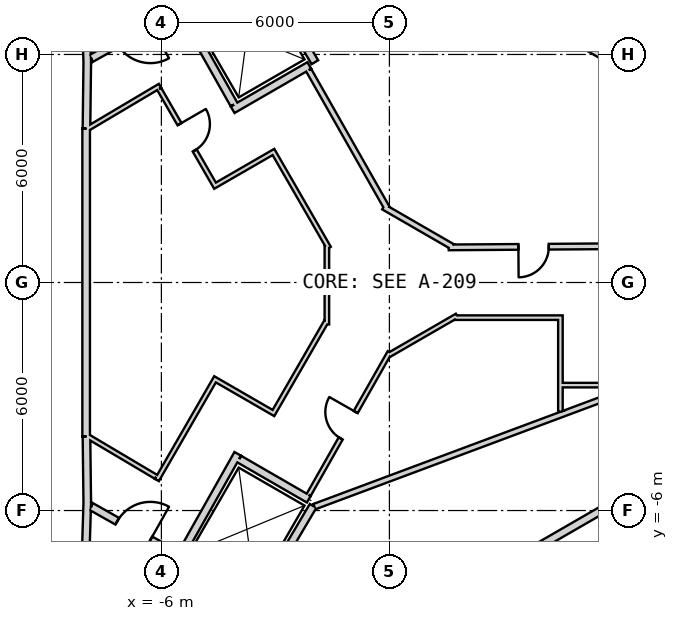
"""IFC4 building model, lengths in metres.
Left out: names, types, materials, properties, quantities, classifications, styles, units other than length and angle.
Written with IfcOpenShell. Run it as: python <this file> out.ifc"""

import sys

from ifc_helpers import new_model, si_unit, direction, frame, frame_2d, origin, place, context, subcontext, project, spatial, rectangle, extrude, element, fill, save


model = new_model("IFC4")
c1 = context("Model", 3, precision=1e-05, world=origin(), true_north=direction((0.0, 1.0)))
c2 = subcontext(c1, "Body", "Model", "MODEL_VIEW")
j1 = project(units=[si_unit("LENGTHUNIT", "METRE"), si_unit("PLANEANGLEUNIT", "RADIAN")], contexts=[c1])
p1 = place(None, origin())
s1 = spatial("IfcSite", under=j1, at=p1, CompositionType="ELEMENT")
p2 = place(p1, origin())
s2 = spatial("IfcBuilding", under=s1, at=p2, CompositionType="ELEMENT")
p3 = place(p2, frame((0.0, 0.0, 39.5)))
s3 = spatial("IfcBuildingStorey", under=s2, at=p3, CompositionType="ELEMENT", Elevation=39.5)
p4 = place(p3, frame((19.475, 2.208, 0.0), z_axis=(0.0, 0.0, 1.0), x_axis=(-0.866028369851, 0.499994862586, 0.0)))
e1 = element("IfcWall", 1, at=p4, inside=s3, PredefinedType="SHEAR", context=c2, shape_type="SweptSolid", body=[
    extrude(rectangle(XDim=31.523, YDim=0.9, at=frame_2d((15.762, 0.0))), origin(), (0.0, 0.0, 1.0), 6.0),
])
p5 = place(p4, frame((3.612, 0.0, 0.0)))
e2 = element("IfcOpeningElement", 2, at=p5, cuts=e1, PredefinedType="OPENING", context=c2, shape_type="SweptSolid", body=[
    extrude(rectangle(XDim=1.2, YDim=2.4, at=frame_2d((0.6, 1.2))), frame((0.0, 0.46, 0.0), z_axis=(0.0, -1.0, 0.0), x_axis=(1.0, 0.0, 0.0)), (0.0, 0.0, 1.0), 0.92),
])
p6 = place(p4, frame((26.712, 0.0, 0.0)))
e3 = element("IfcOpeningElement", 3, at=p6, cuts=e1, PredefinedType="OPENING", context=c2, shape_type="SweptSolid", body=[
    extrude(rectangle(XDim=1.2, YDim=2.4, at=frame_2d((0.6, 1.2))), frame((0.0, 0.46, 0.0), z_axis=(0.0, -1.0, 0.0), x_axis=(1.0, 0.0, 0.0)), (0.0, 0.0, 1.0), 0.92),
])
p7 = place(p3, frame((-7.825, -17.97, 0.0), z_axis=(0.0, 0.0, 1.0), x_axis=(0.866028369851, 0.499994862586, 0.0)))
e4 = element("IfcWall", 4, at=p7, inside=s3, PredefinedType="SHEAR", context=c2, shape_type="SweptSolid", body=[
    extrude(rectangle(XDim=31.523, YDim=0.9, at=frame_2d((15.762, 0.0))), origin(), (0.0, 0.0, 1.0), 6.0),
])
p8 = place(p7, frame((26.712, 0.0, 0.0)))
e5 = element("IfcOpeningElement", 5, at=p8, cuts=e4, PredefinedType="OPENING", context=c2, shape_type="SweptSolid", body=[
    extrude(rectangle(XDim=1.2, YDim=2.4, at=frame_2d((0.6, 1.2))), frame((0.0, 0.46, 0.0), z_axis=(0.0, -1.0, 0.0), x_axis=(1.0, 0.0, 0.0)), (0.0, 0.0, 1.0), 0.92),
])
p9 = place(p7, frame((3.612, 0.0, 0.0)))
e6 = element("IfcOpeningElement", 6, at=p9, cuts=e4, PredefinedType="OPENING", context=c2, shape_type="SweptSolid", body=[
    extrude(rectangle(XDim=1.2, YDim=2.4, at=frame_2d((0.6, 1.2))), frame((0.0, 0.46, 0.0), z_axis=(0.0, -1.0, 0.0), x_axis=(1.0, 0.0, 0.0)), (0.0, 0.0, 1.0), 0.92),
])
p10 = place(p3, frame((7.497, 4.886, 0.0), z_axis=(0.0, 0.0, 1.0), x_axis=(-0.866030989016, 0.499990325971, 0.0)))
e7 = element("IfcWall", 7, at=p10, inside=s3, PredefinedType="PLUMBINGWALL", context=c2, shape_type="SweptSolid", body=[
    extrude(rectangle(XDim=8.1, YDim=0.2, at=frame_2d((4.05, 0.0))), origin(), (0.0, 0.0, 1.0), 5.7),
])
p11 = place(p3, frame((-7.977, 6.65, 0.0), z_axis=(0.0, 0.0, 1.0), x_axis=(0.030861509705, -0.999523670164, 0.0)))
e8 = element("IfcWall", 8, at=p11, inside=s3, PredefinedType="PLUMBINGWALL", context=c2, shape_type="SweptSolid", body=[
    extrude(rectangle(XDim=0.878, YDim=0.2, at=frame_2d((0.439, 0.0))), origin(), (0.0, 0.0, 1.0), 5.7),
])
p12 = place(p3, frame((-7.949, 5.895, 0.0), z_axis=(0.0, 0.0, 1.0), x_axis=(-0.012042535896, -0.999927486035, 0.0)))
e9 = element("IfcWall", 9, at=p12, inside=s3, PredefinedType="PLUMBINGWALL", context=c2, shape_type="SweptSolid", body=[
    extrude(rectangle(XDim=1.845, YDim=0.2, at=frame_2d((0.922, 0.0))), origin(), (0.0, 0.0, 1.0), 5.7),
])
p13 = place(p3, frame((-7.98, 4.05, 0.0), z_axis=(0.0, 0.0, 1.0), x_axis=(0.0, -1.0, 0.0)))
e10 = element("IfcWall", 10, at=p13, inside=s3, PredefinedType="PLUMBINGWALL", context=c2, shape_type="SweptSolid", body=[
    extrude(rectangle(XDim=8.1, YDim=0.2, at=frame_2d((4.05, 0.0))), origin(), (0.0, 0.0, 1.0), 5.7),
])
p14 = place(p3, frame((-7.95, -5.772, 0.0), z_axis=(0.0, 0.0, 1.0), x_axis=(-0.030803413295, -0.999525462272, 0.0)))
e11 = element("IfcWall", 11, at=p14, inside=s3, PredefinedType="PLUMBINGWALL", context=c2, shape_type="SweptSolid", body=[
    extrude(rectangle(XDim=1.078, YDim=0.2, at=frame_2d((0.539, 0.0))), origin(), (0.0, 0.0, 1.0), 5.7),
])
p15 = place(p3, frame((-7.971, -4.05, 0.0), z_axis=(0.0, 0.0, 1.0), x_axis=(0.012042535896, -0.999927486035, 0.0)))
e12 = element("IfcWall", 12, at=p15, inside=s3, PredefinedType="PLUMBINGWALL", context=c2, shape_type="SweptSolid", body=[
    extrude(rectangle(XDim=1.845, YDim=0.2, at=frame_2d((0.922, 0.0))), origin(), (0.0, 0.0, 1.0), 5.7),
])
p16 = place(p3, frame((0.483, -8.936, 0.0), z_axis=(0.0, 0.0, 1.0), x_axis=(0.866030989016, 0.499990325971, 0.0)))
e13 = element("IfcWall", 13, at=p16, inside=s3, PredefinedType="PLUMBINGWALL", context=c2, shape_type="SweptSolid", body=[
    extrude(rectangle(XDim=8.1, YDim=0.2, at=frame_2d((4.05, 0.0))), origin(), (0.0, 0.0, 1.0), 5.7),
])
p17 = place(p3, frame((-3.538, 8.465, 0.0), z_axis=(0.0, 0.0, 1.0), x_axis=(0.508647062354, -0.860975125052, 0.0)))
e14 = element("IfcWall", 14, at=p17, inside=s3, PredefinedType="PLUMBINGWALL", context=c2, shape_type="SweptSolid", body=[
    extrude(rectangle(XDim=3.1, YDim=0.2, at=frame_2d((1.55, 0.0))), origin(), (0.0, 0.0, 1.0), 5.7),
])
p18 = place(p3, frame((-2.108, 5.711, 0.0), z_axis=(0.0, 0.0, 1.0), x_axis=(-0.866009305107, -0.50002788269, 0.0)))
e15 = element("IfcWall", 15, at=p18, inside=s3, PredefinedType="PLUMBINGWALL", context=c2, shape_type="SweptSolid", body=[
    extrude(rectangle(XDim=2.329, YDim=0.2, at=frame_2d((1.165, 0.0))), origin(), (0.0, 0.0, 1.0), 5.7),
])
p19 = place(p3, frame((-5.562, 7.296, 0.0), z_axis=(0.0, 0.0, 1.0), x_axis=(0.49134651263, -0.870964180966, 0.0)))
e16 = element("IfcWall", 16, at=p19, inside=s3, PredefinedType="PLUMBINGWALL", context=c2, shape_type="SweptSolid", body=[
    extrude(rectangle(XDim=3.0, YDim=0.2, at=frame_2d((1.5, 0.0))), origin(), (0.0, 0.0, 1.0), 5.7),
])
p20 = place(p3, frame((-2.008, -5.878, 0.0), z_axis=(0.0, 0.0, 1.0), x_axis=(-0.508893526607, -0.860829471253, 0.0)))
e17 = element("IfcWall", 17, at=p20, inside=s3, PredefinedType="PLUMBINGWALL", context=c2, shape_type="SweptSolid", body=[
    extrude(rectangle(XDim=3.005, YDim=0.2, at=frame_2d((1.502, 0.0))), origin(), (0.0, 0.0, 1.0), 5.7),
])
p21 = place(p3, frame((-3.99, -4.509, 0.0), z_axis=(0.0, 0.0, 1.0), x_axis=(-0.491358283181, -0.870957540612, 0.0)))
e18 = element("IfcWall", 18, at=p21, inside=s3, PredefinedType="PLUMBINGWALL", context=c2, shape_type="SweptSolid", body=[
    extrude(rectangle(XDim=3.2, YDim=0.2, at=frame_2d((1.6, 0.0))), origin(), (0.0, 0.0, 1.0), 5.7),
])
p22 = place(p3, frame((-3.953, -4.646, 0.0), z_axis=(0.0, 0.0, 1.0), x_axis=(0.866060616833, -0.499939004251, 0.0)))
e19 = element("IfcWall", 19, at=p22, inside=s3, PredefinedType="PLUMBINGWALL", context=c2, shape_type="SweptSolid", body=[
    extrude(rectangle(XDim=2.115, YDim=0.2, at=frame_2d((1.057, 0.0))), origin(), (0.0, 0.0, 1.0), 5.7),
])
p23 = place(p3, frame((-5.6, 7.16, 0.0), z_axis=(0.0, 0.0, 1.0), x_axis=(-0.871363259478, -0.490638431059, 0.0)))
e20 = element("IfcWall", 20, at=p23, inside=s3, PredefinedType="PARTITIONING", context=c2, shape_type="SweptSolid", body=[
    extrude(rectangle(XDim=2.581, YDim=0.2, at=frame_2d((1.291, 0.0))), origin(), (0.0, 0.0, 1.0), 5.7),
])
p24 = place(p23, frame((0.791, 0.0, 0.0)))
e21 = element("IfcOpeningElement", 21, at=p24, cuts=e20, PredefinedType="OPENING", context=c2, shape_type="SweptSolid", body=[
    extrude(rectangle(XDim=1.0, YDim=2.1, at=frame_2d((0.5, 1.05))), frame((0.0, 0.11, 0.0), z_axis=(0.0, -1.0, 0.0), x_axis=(1.0, 0.0, 0.0)), (0.0, 0.0, 1.0), 0.22),
])
p25 = place(p3, frame((-7.849, -5.894, 0.0), z_axis=(0.0, 0.0, 1.0), x_axis=(0.871363259478, -0.490638431059, 0.0)))
e22 = element("IfcWall", 22, at=p25, inside=s3, PredefinedType="PARTITIONING", context=c2, shape_type="SweptSolid", body=[
    extrude(rectangle(XDim=2.581, YDim=0.2, at=frame_2d((1.291, 0.0))), origin(), (0.0, 0.0, 1.0), 5.7),
])
p26 = place(p25, frame((0.791, 0.0, 0.0)))
e23 = element("IfcOpeningElement", 23, at=p26, cuts=e22, PredefinedType="OPENING", context=c2, shape_type="SweptSolid", body=[
    extrude(rectangle(XDim=1.0, YDim=2.1, at=frame_2d((0.5, 1.05))), frame((0.0, 0.11, 0.0), z_axis=(0.0, -1.0, 0.0), x_axis=(1.0, 0.0, 0.0)), (0.0, 0.0, 1.0), 0.22),
])
p27 = place(p3, frame((1.561, 0.924, 0.0), z_axis=(0.0, 0.0, 1.0), x_axis=(0.999976441218, 0.006864183077, 0.0)))
e24 = element("IfcWall", 24, at=p27, inside=s3, PredefinedType="PLUMBINGWALL", context=c2, shape_type="SweptSolid", body=[
    extrude(rectangle(XDim=4.339, YDim=0.15, at=frame_2d((2.169, 0.0))), origin(), (0.0, 0.0, 1.0), 5.7),
])
p28 = place(p27, frame((1.833, 0.0, 0.0)))
e25 = element("IfcOpeningElement", 25, at=p28, cuts=e24, PredefinedType="OPENING", context=c2, shape_type="SweptSolid", body=[
    extrude(rectangle(XDim=0.8, YDim=2.1, at=frame_2d((0.4, 1.05))), frame((0.0, 0.085, 0.0), z_axis=(0.0, -1.0, 0.0), x_axis=(1.0, 0.0, 0.0)), (0.0, 0.0, 1.0), 0.17),
])
p29 = place(p3, frame((-0.154, 1.989, 0.0), z_axis=(0.0, 0.0, 1.0), x_axis=(0.865992365033, -0.50005722043, 0.0)))
e26 = element("IfcWall", 26, at=p29, inside=s3, PredefinedType="PLUMBINGWALL", context=c2, shape_type="SweptSolid", body=[
    extrude(rectangle(XDim=2.104, YDim=0.15, at=frame_2d((1.052, 0.0))), origin(), (0.0, 0.0, 1.0), 5.7),
])
p30 = place(p3, frame((-2.124, 5.586, 0.0), z_axis=(0.0, 0.0, 1.0), x_axis=(0.494084527552, -0.869413871314, 0.0)))
e27 = element("IfcWall", 27, at=p30, inside=s3, PredefinedType="PLUMBINGWALL", context=c2, shape_type="SweptSolid", body=[
    extrude(rectangle(XDim=4.188, YDim=0.15, at=frame_2d((2.094, 0.0))), origin(), (0.0, 0.0, 1.0), 5.7),
])
p31 = place(p3, frame((6.729, -2.65, 0.0), z_axis=(0.0, 0.0, 1.0), x_axis=(-0.936914282609, -0.349559189613, 0.0)))
e28 = element("IfcWall", 28, at=p31, inside=s3, PredefinedType="PLUMBINGWALL", context=c2, shape_type="SweptSolid", body=[
    extrude(rectangle(XDim=9.291, YDim=0.15, at=frame_2d((4.645, 0.0))), origin(), (0.0, 0.0, 1.0), 5.7),
])
p32 = place(p3, frame((0.007, -1.836, 0.0), z_axis=(0.0, 0.0, 1.0), x_axis=(-0.494077470797, -0.869417881603, 0.0)))
e29 = element("IfcWall", 29, at=p32, inside=s3, PredefinedType="PARTITIONING", context=c2, shape_type="SweptSolid", body=[
    extrude(rectangle(XDim=4.314, YDim=0.12, at=frame_2d((2.157, 0.0))), origin(), (0.0, 0.0, 1.0), 5.7),
])
p33 = place(p32, frame((1.808, 0.0, 0.0)))
e30 = element("IfcOpeningElement", 30, at=p33, cuts=e29, PredefinedType="OPENING", context=c2, shape_type="SweptSolid", body=[
    extrude(rectangle(XDim=0.8, YDim=2.1, at=frame_2d((0.4, 1.05))), frame((0.0, 0.07, 0.0), z_axis=(0.0, -1.0, 0.0), x_axis=(1.0, 0.0, 0.0)), (0.0, 0.0, 1.0), 0.14),
])
p34 = place(p3, frame((1.779, -0.873, 0.0), z_axis=(0.0, 0.0, 1.0), x_axis=(-0.866029591389, -0.499992746786, 0.0)))
e31 = element("IfcWall", 31, at=p34, inside=s3, PredefinedType="PARTITIONING", context=c2, shape_type="SweptSolid", body=[
    extrude(rectangle(XDim=2.085, YDim=0.12, at=frame_2d((1.042, 0.0))), origin(), (0.0, 0.0, 1.0), 5.7),
])
p35 = place(p3, frame((4.56, -0.925, 0.0), z_axis=(0.0, 0.0, 1.0), x_axis=(-1.0, 0.0, 0.0)))
e32 = element("IfcWall", 32, at=p35, inside=s3, PredefinedType="PARTITIONING", context=c2, shape_type="SweptSolid", body=[
    extrude(rectangle(XDim=2.853, YDim=0.12, at=frame_2d((1.426, 0.0))), origin(), (0.0, 0.0, 1.0), 5.7),
])
p36 = place(p3, frame((4.5, -3.402, 0.0), z_axis=(0.0, 0.0, 1.0), x_axis=(0.0, 1.0, 0.0)))
e33 = element("IfcWall", 33, at=p36, inside=s3, PredefinedType="PARTITIONING", context=c2, shape_type="SweptSolid", body=[
    extrude(rectangle(XDim=2.417, YDim=0.12, at=frame_2d((1.208, 0.0))), origin(), (0.0, 0.0, 1.0), 5.7),
])
p37 = place(p3, frame((6.521, -2.7, 0.0), z_axis=(0.0, 0.0, 1.0), x_axis=(-1.0, 0.0, 0.0)))
e34 = element("IfcWall", 34, at=p37, inside=s3, PredefinedType="PARTITIONING", context=c2, shape_type="SweptSolid", body=[
    extrude(rectangle(XDim=1.961, YDim=0.12, at=frame_2d((0.98, 0.0))), origin(), (0.0, 0.0, 1.0), 5.7),
])
p38 = place(p3, frame((-6.037, 5.176, 0.0), z_axis=(0.0, 0.0, 1.0), x_axis=(-0.860106072674, -0.510115225953, 0.0)))
e35 = element("IfcWall", 35, at=p38, inside=s3, PredefinedType="PARTITIONING", context=c2, shape_type="SweptSolid", body=[
    extrude(rectangle(XDim=2.225, YDim=0.12, at=frame_2d((1.112, 0.0))), origin(), (0.0, 0.0, 1.0), 5.7),
])
p39 = place(p3, frame((-4.558, 2.495, 0.0), z_axis=(0.0, 0.0, 1.0), x_axis=(-0.499990139034, 0.866031096941, 0.0)))
e36 = element("IfcWall", 36, at=p39, inside=s3, PredefinedType="PARTITIONING", context=c2, shape_type="SweptSolid", body=[
    extrude(rectangle(XDim=3.0, YDim=0.12, at=frame_2d((1.5, 0.0))), origin(), (0.0, 0.0, 1.0), 5.7),
])
p40 = place(p39, frame((1.13, 0.0, 0.0)))
e37 = element("IfcOpeningElement", 37, at=p40, cuts=e36, PredefinedType="OPENING", context=c2, shape_type="SweptSolid", body=[
    extrude(rectangle(XDim=0.8, YDim=2.1, at=frame_2d((0.4, 1.05))), frame((0.0, 0.07, 0.0), z_axis=(0.0, -1.0, 0.0), x_axis=(1.0, 0.0, 0.0)), (0.0, 0.0, 1.0), 0.14),
])
p41 = place(p3, frame((-2.999, 3.465, 0.0), z_axis=(0.0, 0.0, 1.0), x_axis=(-0.866059624469, -0.499940723351, 0.0)))
e38 = element("IfcWall", 38, at=p41, inside=s3, PredefinedType="PARTITIONING", context=c2, shape_type="SweptSolid", body=[
    extrude(rectangle(XDim=1.775, YDim=0.12, at=frame_2d((0.888, 0.0))), origin(), (0.0, 0.0, 1.0), 5.7),
])
p42 = place(p3, frame((-1.594, 0.91, 0.0), z_axis=(0.0, 0.0, 1.0), x_axis=(-0.49997412077, 0.866040344649, 0.0)))
e39 = element("IfcWall", 39, at=p42, inside=s3, PredefinedType="PARTITIONING", context=c2, shape_type="SweptSolid", body=[
    extrude(rectangle(XDim=2.855, YDim=0.12, at=frame_2d((1.428, 0.0))), origin(), (0.0, 0.0, 1.0), 5.7),
])
p43 = place(p3, frame((-1.646, -1.104, 0.0), z_axis=(0.0, 0.0, 1.0), x_axis=(0.0, 1.0, 0.0)))
e40 = element("IfcWall", 40, at=p43, inside=s3, PredefinedType="PARTITIONING", context=c2, shape_type="SweptSolid", body=[
    extrude(rectangle(XDim=2.085, YDim=0.12, at=frame_2d((1.043, 0.0))), origin(), (0.0, 0.0, 1.0), 5.7),
])
p44 = place(p3, frame((-3.081, -3.487, 0.0), z_axis=(0.0, 0.0, 1.0), x_axis=(0.499986688891, 0.86603308882, 0.0)))
e41 = element("IfcWall", 41, at=p44, inside=s3, PredefinedType="PARTITIONING", context=c2, shape_type="SweptSolid", body=[
    extrude(rectangle(XDim=2.853, YDim=0.12, at=frame_2d((1.426, 0.0))), origin(), (0.0, 0.0, 1.0), 5.7),
])
p45 = place(p3, frame((-4.64, -2.517, 0.0), z_axis=(0.0, 0.0, 1.0), x_axis=(0.866025242659, -0.500000279077, 0.0)))
e42 = element("IfcWall", 42, at=p45, inside=s3, PredefinedType="PARTITIONING", context=c2, shape_type="SweptSolid", body=[
    extrude(rectangle(XDim=1.775, YDim=0.12, at=frame_2d((0.887, 0.0))), origin(), (0.0, 0.0, 1.0), 5.7),
])
p46 = place(p3, frame((-6.118, -5.197, 0.0), z_axis=(0.0, 0.0, 1.0), x_axis=(0.499990139034, 0.866031096941, 0.0)))
e43 = element("IfcWall", 43, at=p46, inside=s3, PredefinedType="PARTITIONING", context=c2, shape_type="SweptSolid", body=[
    extrude(rectangle(XDim=3.0, YDim=0.12, at=frame_2d((1.5, 0.0))), origin(), (0.0, 0.0, 1.0), 5.7),
])
p47 = place(p3, frame((-7.95, -4.041, 0.0), z_axis=(0.0, 0.0, 1.0), x_axis=(0.860112457103, -0.510104461004, 0.0)))
e44 = element("IfcWall", 44, at=p47, inside=s3, PredefinedType="PARTITIONING", context=c2, shape_type="SweptSolid", body=[
    extrude(rectangle(XDim=2.104, YDim=0.12, at=frame_2d((1.052, 0.0))), origin(), (0.0, 0.0, 1.0), 5.7),
])
p48 = place(p3, frame((3.8, -15.242, 0.0), z_axis=(0.0, 0.0, 1.0), x_axis=(0.866025905383, 0.499999131204, 0.0)))
e45 = element("IfcWall", 45, at=p48, inside=s3, PredefinedType="PARTITIONING", context=c2, shape_type="SweptSolid", body=[
    extrude(rectangle(XDim=20.7, YDim=0.2, at=frame_2d((10.35, 0.0))), origin(), (0.0, 0.0, 1.0), 4.88),
])
p49 = place(p48, frame((1.636, 0.0, 0.0)))
e46 = element("IfcOpeningElement", 46, at=p49, cuts=e45, PredefinedType="OPENING", context=c2, shape_type="SweptSolid", body=[
    extrude(rectangle(XDim=1.0, YDim=2.1, at=frame_2d((0.5, 1.05))), frame((0.0, 0.11, 0.0), z_axis=(0.0, -1.0, 0.0), x_axis=(1.0, 0.0, 0.0)), (0.0, 0.0, 1.0), 0.22),
])
p50 = place(p48, frame((5.812, 0.0, 0.0)))
e47 = element("IfcOpeningElement", 47, at=p50, cuts=e45, PredefinedType="OPENING", context=c2, shape_type="SweptSolid", body=[
    extrude(rectangle(XDim=1.0, YDim=2.1, at=frame_2d((0.5, 1.05))), frame((0.0, 0.11, 0.0), z_axis=(0.0, -1.0, 0.0), x_axis=(1.0, 0.0, 0.0)), (0.0, 0.0, 1.0), 0.22),
])
p51 = place(p48, frame((9.987, 0.0, 0.0)))
e48 = element("IfcOpeningElement", 48, at=p51, cuts=e45, PredefinedType="OPENING", context=c2, shape_type="SweptSolid", body=[
    extrude(rectangle(XDim=1.0, YDim=2.1, at=frame_2d((0.5, 1.05))), frame((0.0, 0.11, 0.0), z_axis=(0.0, -1.0, 0.0), x_axis=(1.0, 0.0, 0.0)), (0.0, 0.0, 1.0), 0.22),
])
p52 = place(p48, frame((14.162, 0.0, 0.0)))
e49 = element("IfcOpeningElement", 49, at=p52, cuts=e45, PredefinedType="OPENING", context=c2, shape_type="SweptSolid", body=[
    extrude(rectangle(XDim=1.0, YDim=2.1, at=frame_2d((0.5, 1.05))), frame((0.0, 0.11, 0.0), z_axis=(0.0, -1.0, 0.0), x_axis=(1.0, 0.0, 0.0)), (0.0, 0.0, 1.0), 0.22),
])
p53 = place(p48, frame((18.138, 0.0, 0.0)))
e50 = element("IfcOpeningElement", 50, at=p53, cuts=e45, PredefinedType="OPENING", context=c2, shape_type="SweptSolid", body=[
    extrude(rectangle(XDim=1.0, YDim=2.1, at=frame_2d((0.5, 1.05))), frame((0.0, 0.11, 0.0), z_axis=(0.0, -1.0, 0.0), x_axis=(1.0, 0.0, 0.0)), (0.0, 0.0, 1.0), 0.22),
])
p54 = place(p26, origin())
e51 = element("IfcDoor", 51, at=p54, inside=s3, OperationType="SINGLE_SWING_RIGHT", PredefinedType="USERDEFINED", context=c2, shape_type="SweptSolid", body=[
    extrude(rectangle(XDim=1.0, YDim=2.1, at=frame_2d((0.5, 1.05))), frame((0.0, 0.025, 0.0), z_axis=(0.0, -1.0, 0.0), x_axis=(1.0, 0.0, 0.0)), (0.0, 0.0, 1.0), 0.05),
])
fill(e23, e51)
p55 = place(p28, origin())
e52 = element("IfcDoor", 52, at=p55, inside=s3, OperationType="SINGLE_SWING_LEFT", PredefinedType="USERDEFINED", context=c2, shape_type="SweptSolid", body=[
    extrude(rectangle(XDim=0.8, YDim=2.1, at=frame_2d((0.4, 1.05))), frame((0.0, 0.025, 0.0), z_axis=(0.0, -1.0, 0.0), x_axis=(1.0, 0.0, 0.0)), (0.0, 0.0, 1.0), 0.05),
])
fill(e25, e52)
p56 = place(p33, origin())
e53 = element("IfcDoor", 53, at=p56, inside=s3, OperationType="SINGLE_SWING_LEFT", PredefinedType="USERDEFINED", context=c2, shape_type="SweptSolid", body=[
    extrude(rectangle(XDim=0.8, YDim=2.1, at=frame_2d((0.4, 1.05))), frame((0.0, 0.025, 0.0), z_axis=(0.0, -1.0, 0.0), x_axis=(1.0, 0.0, 0.0)), (0.0, 0.0, 1.0), 0.05),
])
fill(e30, e53)
p57 = place(p40, origin())
e54 = element("IfcDoor", 54, at=p57, inside=s3, OperationType="SINGLE_SWING_RIGHT", PredefinedType="USERDEFINED", context=c2, shape_type="SweptSolid", body=[
    extrude(rectangle(XDim=0.8, YDim=2.1, at=frame_2d((0.4, 1.05))), frame((0.0, 0.025, 0.0), z_axis=(0.0, -1.0, 0.0), x_axis=(1.0, 0.0, 0.0)), (0.0, 0.0, 1.0), 0.05),
])
fill(e37, e54)
save(model, sys.argv[1])
